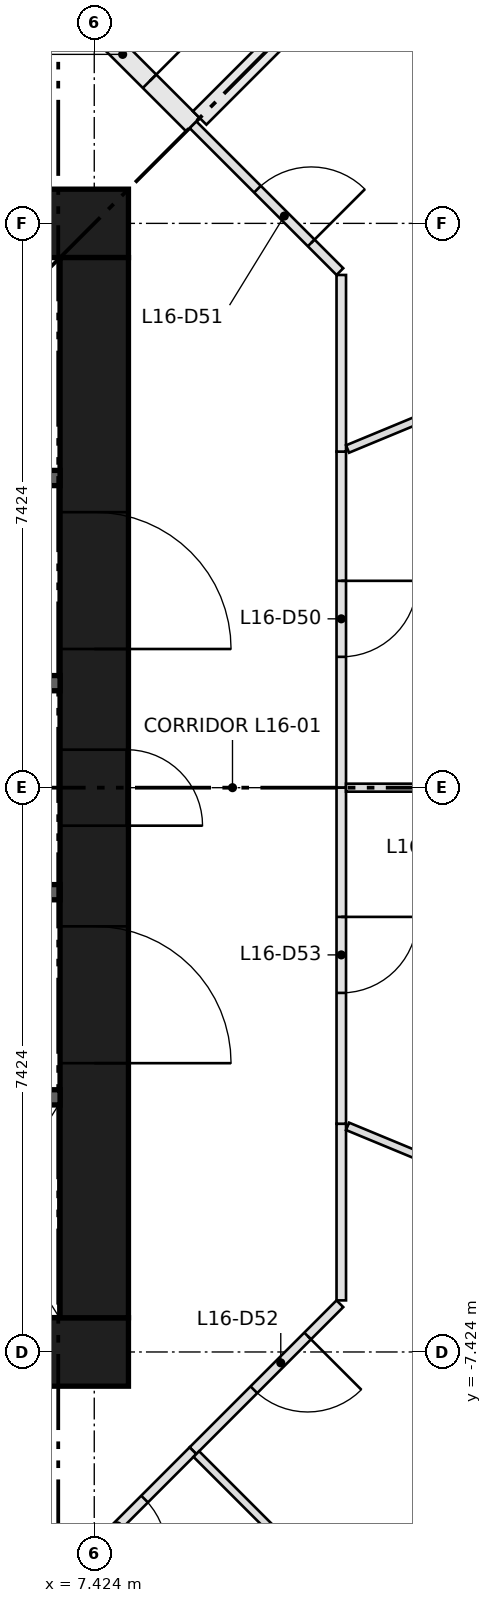
"""IFC4 building model, lengths in metres.
Left out: names, types, materials, properties, quantities, classifications, styles, units other than length and angle.
Written with IfcOpenShell. Run it as: python <this file> out.ifc"""

import sys

from ifc_helpers import new_model, si_unit, direction, frame, frame_2d, origin, place, context, subcontext, project, spatial, rectangle, extrude, element, fill, save


model = new_model("IFC4")
c1 = context("Model", 3, precision=1e-05, world=origin(), true_north=direction((0.0, 1.0)))
c2 = subcontext(c1, "Body", "Model", "MODEL_VIEW")
j1 = project(units=[si_unit("LENGTHUNIT", "METRE"), si_unit("PLANEANGLEUNIT", "RADIAN")], contexts=[c1])
p1 = place(None, origin())
s1 = spatial("IfcSite", under=j1, at=p1, CompositionType="ELEMENT")
p2 = place(p1, origin())
s2 = spatial("IfcBuilding", under=s1, at=p2, CompositionType="ELEMENT")
p3 = place(p2, frame((0.0, 0.0, 62.7)))
s3 = spatial("IfcBuildingStorey", under=s2, at=p3, CompositionType="ELEMENT", Elevation=62.7)
for number, where, z_axis, x_axis in (
    (1, (-7.874, -7.424, 0.0), (0.0, 0.0, 1.0), (1.0, 0.0, 0.0)),
    (2, (-7.874, 7.424, 0.0), (0.0, 0.0, 1.0), (1.0, 0.0, 0.0)),
):
    element("IfcWall", number, at=place(p3, frame(where, z_axis=z_axis, x_axis=x_axis)), inside=s3, PredefinedType="SHEAR", context=c2, shape_type="SweptSolid", body=[
        extrude(rectangle(XDim=15.748, YDim=0.9, at=frame_2d((7.874, 0.0))), origin(), (0.0, 0.0, 1.0), 3.65),
    ])
p4 = place(p3, frame((7.424, -6.974, 0.0), z_axis=(0.0, 0.0, 1.0), x_axis=(0.0, 1.0, 0.0)))
e3 = element("IfcWall", 3, at=p4, inside=s3, PredefinedType="SHEAR", context=c2, shape_type="SweptSolid", body=[
    extrude(rectangle(XDim=13.948, YDim=0.9, at=frame_2d((6.974, 0.0))), origin(), (0.0, 0.0, 1.0), 3.65),
])
p5 = place(p4, frame((6.474, 0.0, 0.0)))
e4 = element("IfcOpeningElement", 4, at=p5, cuts=e3, PredefinedType="OPENING", context=c2, shape_type="SweptSolid", body=[
    extrude(rectangle(XDim=1.0, YDim=2.1, at=frame_2d((0.5, 1.05))), frame((0.0, 0.46, 0.0), z_axis=(0.0, -1.0, 0.0), x_axis=(1.0, 0.0, 0.0)), (0.0, 0.0, 1.0), 0.92),
])
p6 = place(p4, frame((3.35, 0.0, 0.0)))
e5 = element("IfcOpeningElement", 5, at=p6, cuts=e3, PredefinedType="OPENING", context=c2, shape_type="SweptSolid", body=[
    extrude(rectangle(XDim=1.8, YDim=2.1, at=frame_2d((0.9, 1.05))), frame((0.0, 0.46, 0.0), z_axis=(0.0, -1.0, 0.0), x_axis=(1.0, 0.0, 0.0)), (0.0, 0.0, 1.0), 0.92),
])
p7 = place(p4, frame((8.799, 0.0, 0.0)))
e6 = element("IfcOpeningElement", 6, at=p7, cuts=e3, PredefinedType="OPENING", context=c2, shape_type="SweptSolid", body=[
    extrude(rectangle(XDim=1.8, YDim=2.1, at=frame_2d((0.9, 1.05))), frame((0.0, 0.46, 0.0), z_axis=(0.0, -1.0, 0.0), x_axis=(1.0, 0.0, 0.0)), (0.0, 0.0, 1.0), 0.92),
])
p8 = place(p3, frame((-6.974, -4.074, 0.0), z_axis=(0.0, 0.0, 1.0), x_axis=(1.0, 0.0, 0.0)))
e7 = element("IfcWall", 7, at=p8, inside=s3, PredefinedType="SHEAR", context=c2, shape_type="SweptSolid", body=[
    extrude(rectangle(XDim=13.948, YDim=0.2, at=frame_2d((6.974, 0.0))), origin(), (0.0, 0.0, 1.0), 3.3),
])
p9 = place(p8, frame((0.918, 0.0, 0.0)))
e8 = element("IfcOpeningElement", 8, at=p9, cuts=e7, PredefinedType="OPENING", context=c2, shape_type="SweptSolid", body=[
    extrude(rectangle(XDim=1.1, YDim=2.1, at=frame_2d((0.55, 1.05))), frame((0.0, 0.11, 0.0), z_axis=(0.0, -1.0, 0.0), x_axis=(1.0, 0.0, 0.0)), (0.0, 0.0, 1.0), 0.22),
])
p10 = place(p8, frame((4.055, 0.0, 0.0)))
e9 = element("IfcOpeningElement", 9, at=p10, cuts=e7, PredefinedType="OPENING", context=c2, shape_type="SweptSolid", body=[
    extrude(rectangle(XDim=1.1, YDim=2.1, at=frame_2d((0.55, 1.05))), frame((0.0, 0.11, 0.0), z_axis=(0.0, -1.0, 0.0), x_axis=(1.0, 0.0, 0.0)), (0.0, 0.0, 1.0), 0.22),
])
p11 = place(p8, frame((6.658, 0.0, 0.0)))
e10 = element("IfcOpeningElement", 10, at=p11, cuts=e7, PredefinedType="OPENING", context=c2, shape_type="SweptSolid", body=[
    extrude(rectangle(XDim=1.0, YDim=2.1, at=frame_2d((0.5, 1.05))), frame((0.0, 0.11, 0.0), z_axis=(0.0, -1.0, 0.0), x_axis=(1.0, 0.0, 0.0)), (0.0, 0.0, 1.0), 0.22),
])
p12 = place(p8, frame((8.627, 0.0, 0.0)))
e11 = element("IfcOpeningElement", 11, at=p12, cuts=e7, PredefinedType="OPENING", context=c2, shape_type="SweptSolid", body=[
    extrude(rectangle(XDim=1.0, YDim=2.1, at=frame_2d((0.5, 1.05))), frame((0.0, 0.11, 0.0), z_axis=(0.0, -1.0, 0.0), x_axis=(1.0, 0.0, 0.0)), (0.0, 0.0, 1.0), 0.22),
])
p13 = place(p8, frame((10.595, 0.0, 0.0)))
e12 = element("IfcOpeningElement", 12, at=p13, cuts=e7, PredefinedType="OPENING", context=c2, shape_type="SweptSolid", body=[
    extrude(rectangle(XDim=1.0, YDim=2.1, at=frame_2d((0.5, 1.05))), frame((0.0, 0.11, 0.0), z_axis=(0.0, -1.0, 0.0), x_axis=(1.0, 0.0, 0.0)), (0.0, 0.0, 1.0), 0.22),
])
p14 = place(p8, frame((12.564, 0.0, 0.0)))
e13 = element("IfcOpeningElement", 13, at=p14, cuts=e7, PredefinedType="OPENING", context=c2, shape_type="SweptSolid", body=[
    extrude(rectangle(XDim=1.0, YDim=2.1, at=frame_2d((0.5, 1.05))), frame((0.0, 0.11, 0.0), z_axis=(0.0, -1.0, 0.0), x_axis=(1.0, 0.0, 0.0)), (0.0, 0.0, 1.0), 0.22),
])
p15 = place(p3, frame((0.0, 4.074, 0.0), z_axis=(0.0, 0.0, 1.0), x_axis=(1.0, 0.0, 0.0)))
e14 = element("IfcWall", 14, at=p15, inside=s3, PredefinedType="SHEAR", context=c2, shape_type="SweptSolid", body=[
    extrude(rectangle(XDim=6.974, YDim=0.2, at=frame_2d((3.487, 0.0))), origin(), (0.0, 0.0, 1.0), 3.3),
])
p16 = place(p15, frame((0.179, 0.0, 0.0)))
e15 = element("IfcOpeningElement", 15, at=p16, cuts=e14, PredefinedType="OPENING", context=c2, shape_type="SweptSolid", body=[
    extrude(rectangle(XDim=0.95, YDim=2.1, at=frame_2d((0.475, 1.05))), frame((0.0, 0.11, 0.0), z_axis=(0.0, -1.0, 0.0), x_axis=(1.0, 0.0, 0.0)), (0.0, 0.0, 1.0), 0.22),
])
p17 = place(p15, frame((1.922, 0.0, 0.0)))
e16 = element("IfcOpeningElement", 16, at=p17, cuts=e14, PredefinedType="OPENING", context=c2, shape_type="SweptSolid", body=[
    extrude(rectangle(XDim=1.0, YDim=2.1, at=frame_2d((0.5, 1.05))), frame((0.0, 0.11, 0.0), z_axis=(0.0, -1.0, 0.0), x_axis=(1.0, 0.0, 0.0)), (0.0, 0.0, 1.0), 0.22),
])
p18 = place(p15, frame((3.921, 0.0, 0.0)))
e17 = element("IfcOpeningElement", 17, at=p18, cuts=e14, PredefinedType="OPENING", context=c2, shape_type="SweptSolid", body=[
    extrude(rectangle(XDim=1.0, YDim=2.1, at=frame_2d((0.5, 1.05))), frame((0.0, 0.11, 0.0), z_axis=(0.0, -1.0, 0.0), x_axis=(1.0, 0.0, 0.0)), (0.0, 0.0, 1.0), 0.22),
])
p19 = place(p15, frame((5.79, 0.0, 0.0)))
e18 = element("IfcOpeningElement", 18, at=p19, cuts=e14, PredefinedType="OPENING", context=c2, shape_type="SweptSolid", body=[
    extrude(rectangle(XDim=0.8, YDim=2.1, at=frame_2d((0.4, 1.05))), frame((0.0, 0.11, 0.0), z_axis=(0.0, -1.0, 0.0), x_axis=(1.0, 0.0, 0.0)), (0.0, 0.0, 1.0), 0.22),
])
for number, where, z_axis, x_axis in (
    (19, (4.374, -1.375, 0.0), (0.0, 0.0, 1.0), (1.0, 0.0, 0.0)),
    (20, (4.374, 1.375, 0.0), (0.0, 0.0, 1.0), (1.0, 0.0, 0.0)),
):
    element("IfcWall", number, at=place(p3, frame(where, z_axis=z_axis, x_axis=x_axis)), inside=s3, PredefinedType="SHEAR", context=c2, shape_type="SweptSolid", body=[
        extrude(rectangle(XDim=2.6, YDim=0.2, at=frame_2d((1.3, 0.0))), origin(), (0.0, 0.0, 1.0), 3.3),
    ])
p20 = place(p3, frame((10.674, 4.421, 0.0), z_axis=(0.0, 0.0, 1.0), x_axis=(0.0, -1.0, 0.0)))
e21 = element("IfcWall", 21, at=p20, inside=s3, PredefinedType="PARTITIONING", context=c2, shape_type="SweptSolid", body=[
    extrude(rectangle(XDim=4.421, YDim=0.125, at=frame_2d((2.211, 0.0))), origin(), (0.0, 0.0, 1.0), 3.3),
])
p21 = place(p20, frame((1.7, 0.0, 0.0)))
e22 = element("IfcOpeningElement", 22, at=p21, cuts=e21, PredefinedType="OPENING", context=c2, shape_type="SweptSolid", body=[
    extrude(rectangle(XDim=1.0, YDim=2.1, at=frame_2d((0.5, 1.05))), frame((0.0, 0.073, 0.0), z_axis=(0.0, -1.0, 0.0), x_axis=(1.0, 0.0, 0.0)), (0.0, 0.0, 1.0), 0.145),
])
p22 = place(p3, frame((8.722, 8.722, 0.0), z_axis=(0.0, 0.0, 1.0), x_axis=(0.707151428813, -0.707062130741, 0.0)))
e23 = element("IfcWall", 23, at=p22, inside=s3, PredefinedType="PARTITIONING", context=c2, shape_type="SweptSolid", body=[
    extrude(rectangle(XDim=2.734, YDim=0.125, at=frame_2d((1.367, 0.0))), origin(), (0.0, 0.0, 1.0), 3.3),
])
p23 = place(p22, frame((1.2, 0.0, 0.0)))
e24 = element("IfcOpeningElement", 24, at=p23, cuts=e23, PredefinedType="OPENING", context=c2, shape_type="SweptSolid", body=[
    extrude(rectangle(XDim=1.0, YDim=2.1, at=frame_2d((0.5, 1.05))), frame((0.0, 0.073, 0.0), z_axis=(0.0, -1.0, 0.0), x_axis=(1.0, 0.0, 0.0)), (0.0, 0.0, 1.0), 0.145),
])
p24 = place(p3, frame((10.674, 6.745, 0.0), z_axis=(0.0, 0.0, 1.0), x_axis=(0.0, -1.0, 0.0)))
e25 = element("IfcWall", 25, at=p24, inside=s3, PredefinedType="PARTITIONING", context=c2, shape_type="SweptSolid", body=[
    extrude(rectangle(XDim=2.324, YDim=0.125, at=frame_2d((1.162, 0.0))), origin(), (0.0, 0.0, 1.0), 3.3),
])
p25 = place(p3, frame((10.656, -6.789, 0.0), z_axis=(0.0, 0.0, 1.0), x_axis=(-0.707151428813, -0.707062130741, 0.0)))
e26 = element("IfcWall", 26, at=p25, inside=s3, PredefinedType="PARTITIONING", context=c2, shape_type="SweptSolid", body=[
    extrude(rectangle(XDim=2.734, YDim=0.125, at=frame_2d((1.367, 0.0))), origin(), (0.0, 0.0, 1.0), 3.3),
])
p26 = place(p25, frame((0.6, 0.0, 0.0)))
e27 = element("IfcOpeningElement", 27, at=p26, cuts=e26, PredefinedType="OPENING", context=c2, shape_type="SweptSolid", body=[
    extrude(rectangle(XDim=1.0, YDim=2.1, at=frame_2d((0.5, 1.05))), frame((0.0, 0.073, 0.0), z_axis=(0.0, -1.0, 0.0), x_axis=(1.0, 0.0, 0.0)), (0.0, 0.0, 1.0), 0.145),
])
p27 = place(p3, frame((10.674, -4.421, 0.0), z_axis=(0.0, 0.0, 1.0), x_axis=(0.0, -1.0, 0.0)))
e28 = element("IfcWall", 28, at=p27, inside=s3, PredefinedType="PARTITIONING", context=c2, shape_type="SweptSolid", body=[
    extrude(rectangle(XDim=2.324, YDim=0.125, at=frame_2d((1.162, 0.0))), origin(), (0.0, 0.0, 1.0), 3.3),
])
p28 = place(p3, frame((10.674, 0.0, 0.0), z_axis=(0.0, 0.0, 1.0), x_axis=(0.0, -1.0, 0.0)))
e29 = element("IfcWall", 29, at=p28, inside=s3, PredefinedType="PARTITIONING", context=c2, shape_type="SweptSolid", body=[
    extrude(rectangle(XDim=4.421, YDim=0.125, at=frame_2d((2.211, 0.0))), origin(), (0.0, 0.0, 1.0), 3.3),
])
p29 = place(p28, frame((1.7, 0.0, 0.0)))
e30 = element("IfcOpeningElement", 30, at=p29, cuts=e29, PredefinedType="OPENING", context=c2, shape_type="SweptSolid", body=[
    extrude(rectangle(XDim=1.0, YDim=2.1, at=frame_2d((0.5, 1.05))), frame((0.0, 0.073, 0.0), z_axis=(0.0, -1.0, 0.0), x_axis=(1.0, 0.0, 0.0)), (0.0, 0.0, 1.0), 0.145),
])
p30 = place(p3, frame((6.808, 10.637, 0.0), z_axis=(0.0, 0.0, 1.0), x_axis=(0.707061703777, -0.707151855722, 0.0)))
e31 = element("IfcWall", 31, at=p30, inside=s3, PredefinedType="PARTITIONING", context=c2, shape_type="SweptSolid", body=[
    extrude(rectangle(XDim=2.708, YDim=0.25, at=frame_2d((1.354, 0.0))), origin(), (0.0, 0.0, 1.0), 3.3),
])
p31 = place(p30, frame((0.9, 0.0, 0.0)))
e32 = element("IfcOpeningElement", 32, at=p31, cuts=e31, PredefinedType="OPENING", context=c2, shape_type="SweptSolid", body=[
    extrude(rectangle(XDim=1.0, YDim=2.1, at=frame_2d((0.5, 1.05))), frame((0.0, 0.135, 0.0), z_axis=(0.0, -1.0, 0.0), x_axis=(1.0, 0.0, 0.0)), (0.0, 0.0, 1.0), 0.27),
])
p32 = place(p3, frame((8.722, -8.722, 0.0), z_axis=(0.0, 0.0, 1.0), x_axis=(-0.707062130741, -0.707151428813, 0.0)))
e33 = element("IfcWall", 33, at=p32, inside=s3, PredefinedType="PARTITIONING", context=c2, shape_type="SweptSolid", body=[
    extrude(rectangle(XDim=2.734, YDim=0.125, at=frame_2d((1.367, 0.0))), origin(), (0.0, 0.0, 1.0), 3.3),
])
p33 = place(p32, frame((0.9, 0.0, 0.0)))
e34 = element("IfcOpeningElement", 34, at=p33, cuts=e33, PredefinedType="OPENING", context=c2, shape_type="SweptSolid", body=[
    extrude(rectangle(XDim=1.0, YDim=2.1, at=frame_2d((0.5, 1.05))), frame((0.0, 0.073, 0.0), z_axis=(0.0, -1.0, 0.0), x_axis=(1.0, 0.0, 0.0)), (0.0, 0.0, 1.0), 0.145),
])
p34 = place(p3, frame((10.757, 4.456, 0.0), z_axis=(0.0, 0.0, 1.0), x_axis=(0.923886131731, 0.382667500051, 0.0)))
e35 = element("IfcWall", 35, at=p34, inside=s3, PredefinedType="PARTITIONING", context=c2, shape_type="SweptSolid", body=[
    extrude(rectangle(XDim=3.597, YDim=0.105, at=frame_2d((1.798, 0.0))), origin(), (0.0, 0.0, 1.0), 3.3),
])
p35 = place(p3, frame((15.185, 0.0, 0.0), z_axis=(0.0, 0.0, 1.0), x_axis=(-1.0, 0.0, 0.0)))
e36 = element("IfcWall", 36, at=p35, inside=s3, PredefinedType="PARTITIONING", context=c2, shape_type="SweptSolid", body=[
    extrude(rectangle(XDim=4.448, YDim=0.105, at=frame_2d((2.224, 0.0))), origin(), (0.0, 0.0, 1.0), 3.3),
])
p36 = place(p3, frame((12.947, 12.947, 0.0), z_axis=(0.0, 0.0, 1.0), x_axis=(-0.707106781187, -0.707106781187, 0.0)))
e37 = element("IfcWall", 37, at=p36, inside=s3, PredefinedType="PARTITIONING", context=c2, shape_type="SweptSolid", body=[
    extrude(rectangle(XDim=5.85, YDim=0.25, at=frame_2d((2.925, 0.0))), origin(), (0.0, 0.0, 1.0), 3.3),
])
p37 = place(p3, frame((8.767, -8.767, 0.0), z_axis=(0.0, 0.0, 1.0), x_axis=(0.707106781187, -0.707106781187, 0.0)))
e38 = element("IfcWall", 38, at=p37, inside=s3, PredefinedType="PARTITIONING", context=c2, shape_type="SweptSolid", body=[
    extrude(rectangle(XDim=5.912, YDim=0.105, at=frame_2d((2.956, 0.0))), origin(), (0.0, 0.0, 1.0), 3.3),
])
p38 = place(p3, frame((10.757, -4.456, 0.0), z_axis=(0.0, 0.0, 1.0), x_axis=(0.923886131731, -0.382667500051, 0.0)))
e39 = element("IfcWall", 39, at=p38, inside=s3, PredefinedType="PARTITIONING", context=c2, shape_type="SweptSolid", body=[
    extrude(rectangle(XDim=3.597, YDim=0.105, at=frame_2d((1.798, 0.0))), origin(), (0.0, 0.0, 1.0), 3.3),
])
p39 = place(p5, frame((1.0, 0.0, 0.0), z_axis=(0.0, 0.0, 1.0), x_axis=(-1.0, 0.0, 0.0)))
e40 = element("IfcDoor", 40, at=p39, inside=s3, OperationType="SINGLE_SWING_LEFT", PredefinedType="DOOR", context=c2, shape_type="SweptSolid", body=[
    extrude(rectangle(XDim=1.0, YDim=2.1, at=frame_2d((0.5, 1.05))), frame((0.0, 0.45, 0.0), z_axis=(0.0, -1.0, 0.0), x_axis=(1.0, 0.0, 0.0)), (0.0, 0.0, 1.0), 0.05),
])
fill(e4, e40)
p40 = place(p6, frame((1.8, 0.0, 0.0), z_axis=(0.0, 0.0, 1.0), x_axis=(-1.0, 0.0, 0.0)))
e41 = element("IfcDoor", 41, at=p40, inside=s3, OperationType="DOUBLE_DOOR_SINGLE_SWING", PredefinedType="DOOR", context=c2, shape_type="SweptSolid", body=[
    extrude(rectangle(XDim=1.8, YDim=2.1, at=frame_2d((0.9, 1.05))), frame((0.0, 0.025, 0.0), z_axis=(0.0, -1.0, 0.0), x_axis=(1.0, 0.0, 0.0)), (0.0, 0.0, 1.0), 0.05),
])
fill(e5, e41)
p41 = place(p7, frame((1.8, 0.0, 0.0), z_axis=(0.0, 0.0, 1.0), x_axis=(-1.0, 0.0, 0.0)))
e42 = element("IfcDoor", 42, at=p41, inside=s3, OperationType="DOUBLE_DOOR_SINGLE_SWING", PredefinedType="DOOR", context=c2, shape_type="SweptSolid", body=[
    extrude(rectangle(XDim=1.8, YDim=2.1, at=frame_2d((0.9, 1.05))), frame((0.0, 0.025, 0.0), z_axis=(0.0, -1.0, 0.0), x_axis=(1.0, 0.0, 0.0)), (0.0, 0.0, 1.0), 0.05),
])
fill(e6, e42)
p42 = place(p21, origin())
e43 = element("IfcDoor", 43, at=p42, inside=s3, OperationType="SINGLE_SWING_LEFT", PredefinedType="DOOR", context=c2, shape_type="SweptSolid", body=[
    extrude(rectangle(XDim=1.0, YDim=2.1, at=frame_2d((0.5, 1.05))), frame((0.0, 0.025, 0.0), z_axis=(0.0, -1.0, 0.0), x_axis=(1.0, 0.0, 0.0)), (0.0, 0.0, 1.0), 0.05),
])
fill(e22, e43)
p43 = place(p23, origin())
e44 = element("IfcDoor", 44, at=p43, inside=s3, OperationType="SINGLE_SWING_RIGHT", PredefinedType="DOOR", context=c2, shape_type="SweptSolid", body=[
    extrude(rectangle(XDim=1.0, YDim=2.1, at=frame_2d((0.5, 1.05))), frame((0.0, 0.025, 0.0), z_axis=(0.0, -1.0, 0.0), x_axis=(1.0, 0.0, 0.0)), (0.0, 0.0, 1.0), 0.05),
])
fill(e24, e44)
p44 = place(p26, origin())
e45 = element("IfcDoor", 45, at=p44, inside=s3, OperationType="SINGLE_SWING_LEFT", PredefinedType="DOOR", context=c2, shape_type="SweptSolid", body=[
    extrude(rectangle(XDim=1.0, YDim=2.1, at=frame_2d((0.5, 1.05))), frame((0.0, 0.025, 0.0), z_axis=(0.0, -1.0, 0.0), x_axis=(1.0, 0.0, 0.0)), (0.0, 0.0, 1.0), 0.05),
])
fill(e27, e45)
p45 = place(p29, origin())
e46 = element("IfcDoor", 46, at=p45, inside=s3, OperationType="SINGLE_SWING_LEFT", PredefinedType="DOOR", context=c2, shape_type="SweptSolid", body=[
    extrude(rectangle(XDim=1.0, YDim=2.1, at=frame_2d((0.5, 1.05))), frame((0.0, 0.025, 0.0), z_axis=(0.0, -1.0, 0.0), x_axis=(1.0, 0.0, 0.0)), (0.0, 0.0, 1.0), 0.05),
])
fill(e30, e46)
p46 = place(p31, origin())
e47 = element("IfcDoor", 47, at=p46, inside=s3, OperationType="SINGLE_SWING_RIGHT", PredefinedType="DOOR", context=c2, shape_type="SweptSolid", body=[
    extrude(rectangle(XDim=1.0, YDim=2.1, at=frame_2d((0.5, 1.05))), frame((0.0, 0.025, 0.0), z_axis=(0.0, -1.0, 0.0), x_axis=(1.0, 0.0, 0.0)), (0.0, 0.0, 1.0), 0.05),
])
fill(e32, e47)
p47 = place(p33, origin())
e48 = element("IfcDoor", 48, at=p47, inside=s3, OperationType="SINGLE_SWING_RIGHT", PredefinedType="DOOR", context=c2, shape_type="SweptSolid", body=[
    extrude(rectangle(XDim=1.0, YDim=2.1, at=frame_2d((0.5, 1.05))), frame((0.0, 0.025, 0.0), z_axis=(0.0, -1.0, 0.0), x_axis=(1.0, 0.0, 0.0)), (0.0, 0.0, 1.0), 0.05),
])
fill(e34, e48)
save(model, sys.argv[1])
